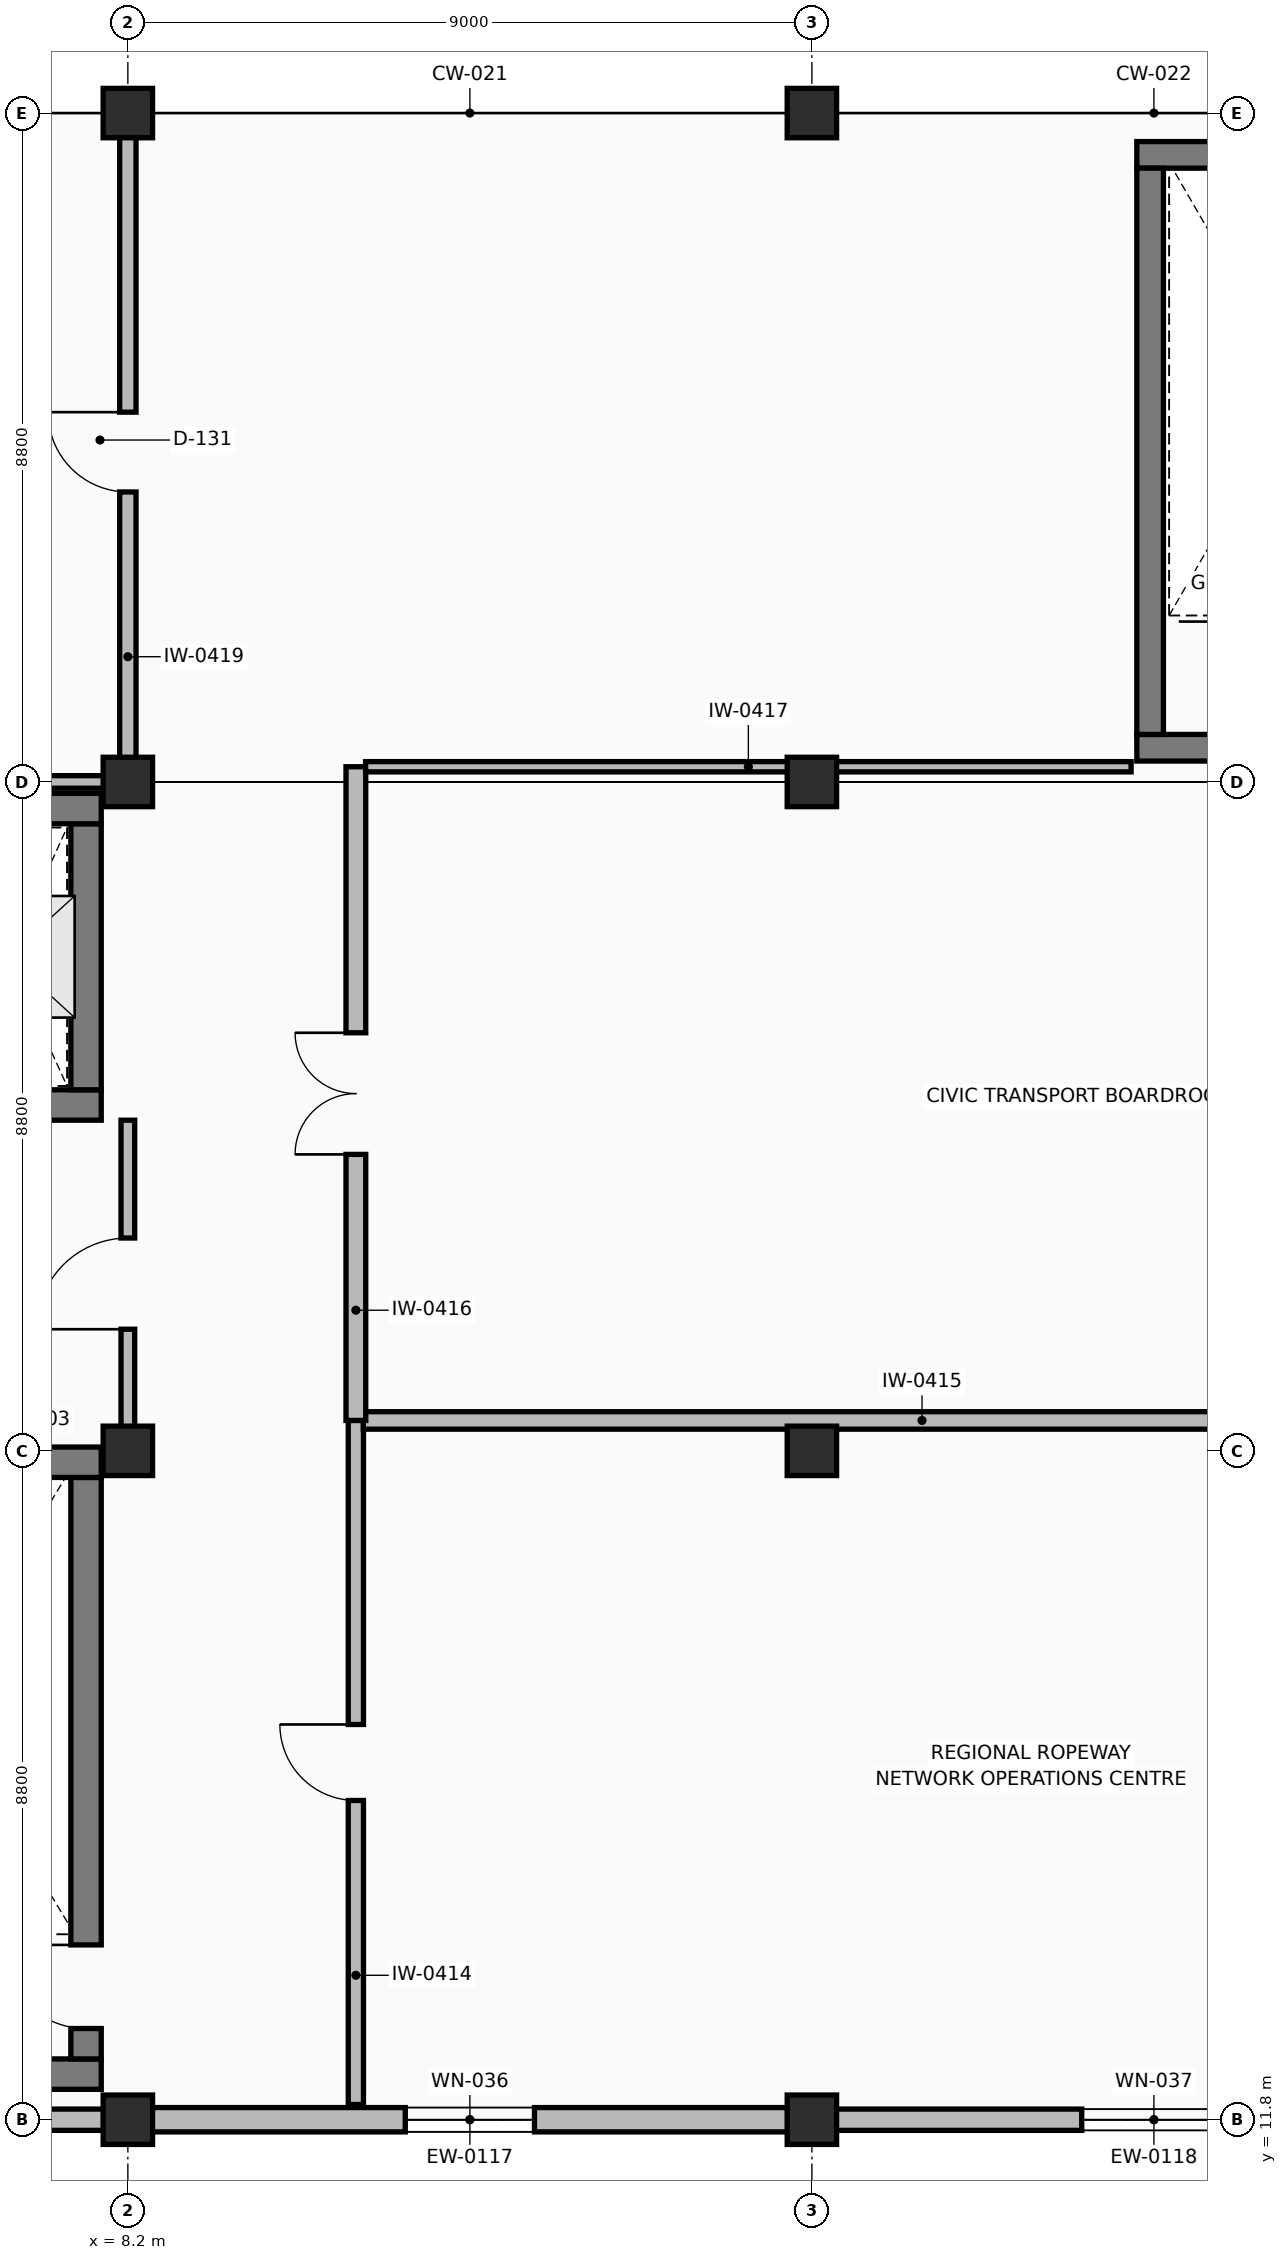
"""IFC4 building model, lengths in metres.
Left out: names, types, materials, properties, quantities, classifications, styles, units other than length and angle.
Written with IfcOpenShell. Run it as: python <this file> out.ifc"""

import sys

from ifc_helpers import new_model, si_unit, direction, frame, frame_2d, origin, origin_2d, place, context, subcontext, project, spatial, rectangle, extrude, element, fill, save


model = new_model("IFC4")
c1 = context("Model", 3, precision=1e-05, world=origin(), true_north=direction((0.0, 1.0)))
c2 = subcontext(c1, "Body", "Model", "MODEL_VIEW")
j1 = project(units=[si_unit("LENGTHUNIT", "METRE"), si_unit("PLANEANGLEUNIT", "RADIAN")], contexts=[c1])
p1 = place(None, origin())
s1 = spatial("IfcSite", under=j1, at=p1, CompositionType="ELEMENT")
p2 = place(p1, origin())
s2 = spatial("IfcBuilding", under=s1, at=p2, CompositionType="ELEMENT")
p3 = place(p2, frame((0.0, 0.0, 14.4)))
s3 = spatial("IfcBuildingStorey", under=s2, at=p3, CompositionType="ELEMENT", Elevation=14.4)
for number, where, z_axis, x_axis in (
    (1, (8.2, 11.8, 0.0), (0.0, 0.0, 1.0), (1.0, 0.0, 0.0)),
    (2, (8.2, 20.6, 0.0), (0.0, 0.0, 1.0), (1.0, 0.0, 0.0)),
    (3, (8.2, 29.4, 0.0), (0.0, 0.0, 1.0), (1.0, 0.0, 0.0)),
    (4, (8.2, 38.2, 0.0), (0.0, 0.0, 1.0), (1.0, 0.0, 0.0)),
    (5, (17.2, 11.8, 0.0), (0.0, 0.0, 1.0), (1.0, 0.0, 0.0)),
    (6, (17.2, 20.6, 0.0), (0.0, 0.0, 1.0), (1.0, 0.0, 0.0)),
    (7, (17.2, 29.4, 0.0), (0.0, 0.0, 1.0), (1.0, 0.0, 0.0)),
    (8, (17.2, 38.2, 0.0), (0.0, 0.0, 1.0), (1.0, 0.0, 0.0)),
):
    element("IfcColumn", number, at=place(p3, frame(where, z_axis=z_axis, x_axis=x_axis)), inside=s3, PredefinedType="COLUMN", context=c2, shape_type="SweptSolid", body=[
        extrude(rectangle(XDim=0.65, YDim=0.65, at=origin_2d()), origin(), (0.0, 0.0, 1.0), 4.5),
    ])
p4 = place(p3, frame((3.32, 11.8, 0.0), z_axis=(0.0, 0.0, 1.0), x_axis=(1.0, 0.0, 0.0)))
e9 = element("IfcWall", 9, at=p4, inside=s3, PredefinedType="SOLIDWALL", context=c2, shape_type="SweptSolid", body=[
    extrude(rectangle(XDim=4.56, YDim=0.28, at=frame_2d((2.28, 0.0))), origin(), (0.0, 0.0, 1.0), 3.375),
])
p5 = place(p4, frame((1.63, 0.0, 0.9)))
e10 = element("IfcOpeningElement", 10, at=p5, cuts=e9, PredefinedType="OPENING", context=c2, shape_type="SweptSolid", body=[
    extrude(rectangle(XDim=1.3, YDim=1.45, at=frame_2d((0.65, 0.725))), frame((0.0, 0.15, 0.0), z_axis=(0.0, -1.0, 0.0), x_axis=(1.0, 0.0, 0.0)), (0.0, 0.0, 1.0), 0.3),
])
p6 = place(p3, frame((8.52, 11.8, 0.0), z_axis=(0.0, 0.0, 1.0), x_axis=(1.0, 0.0, 0.0)))
e11 = element("IfcWall", 11, at=p6, inside=s3, PredefinedType="SOLIDWALL", context=c2, shape_type="SweptSolid", body=[
    extrude(rectangle(XDim=8.36, YDim=0.32, at=frame_2d((4.18, 0.0))), origin(), (0.0, 0.0, 1.0), 3.375),
])
p7 = place(p6, frame((3.33, 0.0, 0.9)))
e12 = element("IfcOpeningElement", 12, at=p7, cuts=e11, PredefinedType="OPENING", context=c2, shape_type="SweptSolid", body=[
    extrude(rectangle(XDim=1.7, YDim=1.5, at=frame_2d((0.85, 0.75))), frame((0.0, 0.17, 0.0), z_axis=(0.0, -1.0, 0.0), x_axis=(1.0, 0.0, 0.0)), (0.0, 0.0, 1.0), 0.34),
])
p8 = place(p3, frame((17.52, 11.8, 0.0), z_axis=(0.0, 0.0, 1.0), x_axis=(1.0, 0.0, 0.0)))
e13 = element("IfcWall", 13, at=p8, inside=s3, PredefinedType="SOLIDWALL", context=c2, shape_type="SweptSolid", body=[
    extrude(rectangle(XDim=8.36, YDim=0.28, at=frame_2d((4.18, 0.0))), origin(), (0.0, 0.0, 1.0), 3.375),
])
p9 = place(p8, frame((3.23, 0.0, 0.9)))
e14 = element("IfcOpeningElement", 14, at=p9, cuts=e13, PredefinedType="OPENING", context=c2, shape_type="SweptSolid", body=[
    extrude(rectangle(XDim=1.9, YDim=1.55, at=frame_2d((0.95, 0.775))), frame((0.0, 0.15, 0.0), z_axis=(0.0, -1.0, 0.0), x_axis=(1.0, 0.0, 0.0)), (0.0, 0.0, 1.0), 0.3),
])
p10 = place(p3, frame((3.45, 12.4, 0.0), z_axis=(0.0, 0.0, 1.0), x_axis=(1.0, 0.0, 0.0)))
e15 = element("IfcWall", 15, at=p10, inside=s3, PredefinedType="SHEAR", context=c2, shape_type="SweptSolid", body=[
    extrude(rectangle(XDim=4.4, YDim=0.4, at=frame_2d((2.2, 0.0))), origin(), (0.0, 0.0, 1.0), 4.19),
])
p11 = place(p3, frame((7.65, 12.6, 0.0), z_axis=(0.0, 0.0, 1.0), x_axis=(0.0, 1.0, 0.0)))
e16 = element("IfcWall", 16, at=p11, inside=s3, PredefinedType="SHEAR", context=c2, shape_type="SweptSolid", body=[
    extrude(rectangle(XDim=7.65, YDim=0.4, at=frame_2d((3.825, 0.0))), origin(), (0.0, 0.0, 1.0), 4.19),
])
p12 = place(p11, frame((0.4, 0.0, 0.0)))
e17 = element("IfcOpeningElement", 17, at=p12, cuts=e16, PredefinedType="OPENING", context=c2, shape_type="SweptSolid", body=[
    extrude(rectangle(XDim=1.1, YDim=2.2, at=frame_2d((0.55, 1.1))), frame((0.0, 0.21, 0.0), z_axis=(0.0, -1.0, 0.0), x_axis=(1.0, 0.0, 0.0)), (0.0, 0.0, 1.0), 0.42),
])
p13 = place(p3, frame((7.85, 20.45, 0.0), z_axis=(0.0, 0.0, 1.0), x_axis=(-1.0, 0.0, 0.0)))
e18 = element("IfcWall", 18, at=p13, inside=s3, PredefinedType="SHEAR", context=c2, shape_type="SweptSolid", body=[
    extrude(rectangle(XDim=4.4, YDim=0.4, at=frame_2d((2.2, 0.0))), origin(), (0.0, 0.0, 1.0), 4.19),
])
p14 = place(p3, frame((3.45, 25.15, 0.0), z_axis=(0.0, 0.0, 1.0), x_axis=(1.0, 0.0, 0.0)))
e19 = element("IfcWall", 19, at=p14, inside=s3, PredefinedType="SHEAR", context=c2, shape_type="SweptSolid", body=[
    extrude(rectangle(XDim=4.4, YDim=0.4, at=frame_2d((2.2, 0.0))), origin(), (0.0, 0.0, 1.0), 4.19),
])
p15 = place(p14, frame((1.65, 0.0, 0.0)))
e20 = element("IfcOpeningElement", 20, at=p15, cuts=e19, PredefinedType="OPENING", context=c2, shape_type="SweptSolid", body=[
    extrude(rectangle(XDim=1.1, YDim=2.2, at=frame_2d((0.55, 1.1))), frame((0.0, 0.21, 0.0), z_axis=(0.0, -1.0, 0.0), x_axis=(1.0, 0.0, 0.0)), (0.0, 0.0, 1.0), 0.42),
])
p16 = place(p3, frame((7.65, 25.35, 0.0), z_axis=(0.0, 0.0, 1.0), x_axis=(0.0, 1.0, 0.0)))
e21 = element("IfcWall", 21, at=p16, inside=s3, PredefinedType="SHEAR", context=c2, shape_type="SweptSolid", body=[
    extrude(rectangle(XDim=3.5, YDim=0.4, at=frame_2d((1.75, 0.0))), origin(), (0.0, 0.0, 1.0), 4.19),
])
p17 = place(p3, frame((7.85, 29.05, 0.0), z_axis=(0.0, 0.0, 1.0), x_axis=(-1.0, 0.0, 0.0)))
e22 = element("IfcWall", 22, at=p17, inside=s3, PredefinedType="SHEAR", context=c2, shape_type="SweptSolid", body=[
    extrude(rectangle(XDim=4.4, YDim=0.4, at=frame_2d((2.2, 0.0))), origin(), (0.0, 0.0, 1.0), 4.19),
])
p18 = place(p3, frame((21.475, 29.85, 0.0), z_axis=(0.0, 0.0, 1.0), x_axis=(1.0, 0.0, 0.0)))
e23 = element("IfcWall", 23, at=p18, inside=s3, PredefinedType="SHEAR", context=c2, shape_type="SweptSolid", body=[
    extrude(rectangle(XDim=4.25, YDim=0.35, at=frame_2d((2.125, 0.0))), origin(), (0.0, 0.0, 1.0), 4.19),
])
p19 = place(p18, frame((1.3, 0.0, 0.0)))
e24 = element("IfcOpeningElement", 24, at=p19, cuts=e23, PredefinedType="OPENING", context=c2, shape_type="SweptSolid", body=[
    extrude(rectangle(XDim=1.1, YDim=2.2, at=frame_2d((0.55, 1.1))), frame((0.0, 0.185, 0.0), z_axis=(0.0, -1.0, 0.0), x_axis=(1.0, 0.0, 0.0)), (0.0, 0.0, 1.0), 0.37),
])
p20 = place(p3, frame((25.725, 37.65, 0.0), z_axis=(0.0, 0.0, 1.0), x_axis=(-1.0, 0.0, 0.0)))
e25 = element("IfcWall", 25, at=p20, inside=s3, PredefinedType="SHEAR", context=c2, shape_type="SweptSolid", body=[
    extrude(rectangle(XDim=4.25, YDim=0.35, at=frame_2d((2.125, 0.0))), origin(), (0.0, 0.0, 1.0), 4.19),
])
p21 = place(p3, frame((21.65, 37.475, 0.0), z_axis=(0.0, 0.0, 1.0), x_axis=(0.0, -1.0, 0.0)))
e26 = element("IfcWall", 26, at=p21, inside=s3, PredefinedType="SHEAR", context=c2, shape_type="SweptSolid", body=[
    extrude(rectangle(XDim=7.45, YDim=0.35, at=frame_2d((3.725, 0.0))), origin(), (0.0, 0.0, 1.0), 4.19),
])
p22 = place(p3, frame((8.2, 20.65, 0.0), z_axis=(0.0, 0.0, 1.0), x_axis=(0.0, 1.0, 0.0)))
e27 = element("IfcWall", 27, at=p22, inside=s3, PredefinedType="STANDARD", context=c2, shape_type="SweptSolid", body=[
    extrude(rectangle(XDim=4.3, YDim=0.18, at=frame_2d((2.15, 0.0))), origin(), (0.0, 0.0, 1.0), 3.365),
])
p23 = place(p22, frame((1.55, 0.0, 0.0)))
e28 = element("IfcOpeningElement", 28, at=p23, cuts=e27, PredefinedType="OPENING", context=c2, shape_type="SweptSolid", body=[
    extrude(rectangle(XDim=1.2, YDim=2.2, at=frame_2d((0.6, 1.1))), frame((0.0, 0.1, 0.0), z_axis=(0.0, -1.0, 0.0), x_axis=(1.0, 0.0, 0.0)), (0.0, 0.0, 1.0), 0.2),
])
p24 = place(p3, frame((11.2, 12.0, 0.0), z_axis=(0.0, 0.0, 1.0), x_axis=(0.0, 1.0, 0.0)))
e29 = element("IfcWall", 29, at=p24, inside=s3, PredefinedType="PARTITIONING", context=c2, shape_type="SweptSolid", body=[
    extrude(rectangle(XDim=9.0, YDim=0.2, at=frame_2d((4.5, 0.0))), origin(), (0.0, 0.0, 1.0), 3.365),
])
p25 = place(p24, frame((4.0, 0.0, 0.0)))
e30 = element("IfcOpeningElement", 30, at=p25, cuts=e29, PredefinedType="OPENING", context=c2, shape_type="SweptSolid", body=[
    extrude(rectangle(XDim=1.0, YDim=2.15, at=frame_2d((0.5, 1.075))), frame((0.0, 0.11, 0.0), z_axis=(0.0, -1.0, 0.0), x_axis=(1.0, 0.0, 0.0)), (0.0, 0.0, 1.0), 0.22),
])
p26 = place(p3, frame((11.298, 21.0, 0.0), z_axis=(0.0, 0.0, 1.0), x_axis=(1.0, 0.0, 0.0)))
e31 = element("IfcWall", 31, at=p26, inside=s3, PredefinedType="PARTITIONING", context=c2, shape_type="SweptSolid", body=[
    extrude(rectangle(XDim=14.702, YDim=0.23, at=frame_2d((7.351, 0.0))), origin(), (0.0, 0.0, 1.0), 3.365),
])
p27 = place(p3, frame((11.2, 21.0, 0.0), z_axis=(0.0, 0.0, 1.0), x_axis=(0.0, 1.0, 0.0)))
e32 = element("IfcWall", 32, at=p27, inside=s3, PredefinedType="PARTITIONING", context=c2, shape_type="SweptSolid", body=[
    extrude(rectangle(XDim=8.6, YDim=0.26, at=frame_2d((4.3, 0.0))), origin(), (0.0, 0.0, 1.0), 3.365),
])
p28 = place(p27, frame((3.5, 0.0, 0.0)))
e33 = element("IfcOpeningElement", 33, at=p28, cuts=e32, PredefinedType="OPENING", context=c2, shape_type="SweptSolid", body=[
    extrude(rectangle(XDim=1.6, YDim=2.25, at=frame_2d((0.8, 1.125))), frame((0.0, 0.14, 0.0), z_axis=(0.0, -1.0, 0.0), x_axis=(1.0, 0.0, 0.0)), (0.0, 0.0, 1.0), 0.28),
])
p29 = place(p3, frame((11.328, 29.6, 0.0), z_axis=(0.0, 0.0, 1.0), x_axis=(1.0, 0.0, 0.0)))
e34 = element("IfcWall", 34, at=p29, inside=s3, PredefinedType="PARTITIONING", context=c2, shape_type="SweptSolid", body=[
    extrude(rectangle(XDim=10.072, YDim=0.135, at=frame_2d((5.036, 0.0))), origin(), (0.0, 0.0, 1.0), 3.365),
])
p30 = place(p3, frame((3.2, 29.4, 0.0), z_axis=(0.0, 0.0, 1.0), x_axis=(1.0, 0.0, 0.0)))
e35 = element("IfcWall", 35, at=p30, inside=s3, PredefinedType="PARTITIONING", context=c2, shape_type="SweptSolid", body=[
    extrude(rectangle(XDim=5.0, YDim=0.165, at=frame_2d((2.5, 0.0))), origin(), (0.0, 0.0, 1.0), 3.365),
])
p31 = place(p3, frame((8.2, 29.48, 0.0), z_axis=(0.0, 0.0, 1.0), x_axis=(0.0, 1.0, 0.0)))
e36 = element("IfcWall", 36, at=p31, inside=s3, PredefinedType="PARTITIONING", context=c2, shape_type="SweptSolid", body=[
    extrude(rectangle(XDim=8.52, YDim=0.215, at=frame_2d((4.26, 0.0))), origin(), (0.0, 0.0, 1.0), 3.365),
])
p32 = place(p31, frame((3.735, 0.0, 0.0)))
e37 = element("IfcOpeningElement", 37, at=p32, cuts=e36, PredefinedType="OPENING", context=c2, shape_type="SweptSolid", body=[
    extrude(rectangle(XDim=1.05, YDim=2.15, at=frame_2d((0.525, 1.075))), frame((0.0, 0.117, 0.0), z_axis=(0.0, -1.0, 0.0), x_axis=(1.0, 0.0, 0.0)), (0.0, 0.0, 1.0), 0.235),
])
p33 = place(p7, origin())
e38 = element("IfcWindow", 38, at=p33, inside=s3, PartitioningType="SINGLE_PANEL", PredefinedType="WINDOW", context=c2, shape_type="SweptSolid", body=[
    extrude(rectangle(XDim=1.7, YDim=1.5, at=frame_2d((0.85, 0.75))), frame((0.0, 0.03, 0.0), z_axis=(0.0, -1.0, 0.0), x_axis=(1.0, 0.0, 0.0)), (0.0, 0.0, 1.0), 0.06),
])
fill(e12, e38)
p34 = place(p9, origin())
e39 = element("IfcWindow", 39, at=p34, inside=s3, PartitioningType="SINGLE_PANEL", PredefinedType="WINDOW", context=c2, shape_type="SweptSolid", body=[
    extrude(rectangle(XDim=1.9, YDim=1.55, at=frame_2d((0.95, 0.775))), frame((0.0, 0.03, 0.0), z_axis=(0.0, -1.0, 0.0), x_axis=(1.0, 0.0, 0.0)), (0.0, 0.0, 1.0), 0.06),
])
fill(e14, e39)
p35 = place(p12, origin())
e40 = element("IfcDoor", 40, at=p35, inside=s3, OperationType="SINGLE_SWING_RIGHT", PredefinedType="DOOR", context=c2, shape_type="SweptSolid", body=[
    extrude(rectangle(XDim=1.1, YDim=2.2, at=frame_2d((0.55, 1.1))), frame((0.0, 0.025, 0.0), z_axis=(0.0, -1.0, 0.0), x_axis=(1.0, 0.0, 0.0)), (0.0, 0.0, 1.0), 0.05),
])
fill(e17, e40)
p36 = place(p23, origin())
e41 = element("IfcDoor", 41, at=p36, inside=s3, OperationType="SINGLE_SWING_LEFT", PredefinedType="DOOR", context=c2, shape_type="SweptSolid", body=[
    extrude(rectangle(XDim=1.2, YDim=2.2, at=frame_2d((0.6, 1.1))), frame((0.0, 0.025, 0.0), z_axis=(0.0, -1.0, 0.0), x_axis=(1.0, 0.0, 0.0)), (0.0, 0.0, 1.0), 0.05),
])
fill(e28, e41)
p37 = place(p25, origin())
e42 = element("IfcDoor", 42, at=p37, inside=s3, OperationType="SINGLE_SWING_RIGHT", PredefinedType="DOOR", context=c2, shape_type="SweptSolid", body=[
    extrude(rectangle(XDim=1.0, YDim=2.15, at=frame_2d((0.5, 1.075))), frame((0.0, 0.025, 0.0), z_axis=(0.0, -1.0, 0.0), x_axis=(1.0, 0.0, 0.0)), (0.0, 0.0, 1.0), 0.05),
])
fill(e30, e42)
p38 = place(p28, origin())
e43 = element("IfcDoor", 43, at=p38, inside=s3, OperationType="DOUBLE_SWING_LEFT", PredefinedType="DOOR", context=c2, shape_type="SweptSolid", body=[
    extrude(rectangle(XDim=1.6, YDim=2.25, at=frame_2d((0.8, 1.125))), frame((0.0, 0.025, 0.0), z_axis=(0.0, -1.0, 0.0), x_axis=(1.0, 0.0, 0.0)), (0.0, 0.0, 1.0), 0.05),
])
fill(e33, e43)
p39 = place(p32, origin())
e44 = element("IfcDoor", 44, at=p39, inside=s3, OperationType="SINGLE_SWING_RIGHT", PredefinedType="DOOR", context=c2, shape_type="SweptSolid", body=[
    extrude(rectangle(XDim=1.05, YDim=2.15, at=frame_2d((0.525, 1.075))), frame((0.0, 0.025, 0.0), z_axis=(0.0, -1.0, 0.0), x_axis=(1.0, 0.0, 0.0)), (0.0, 0.0, 1.0), 0.05),
])
fill(e37, e44)
save(model, sys.argv[1])
